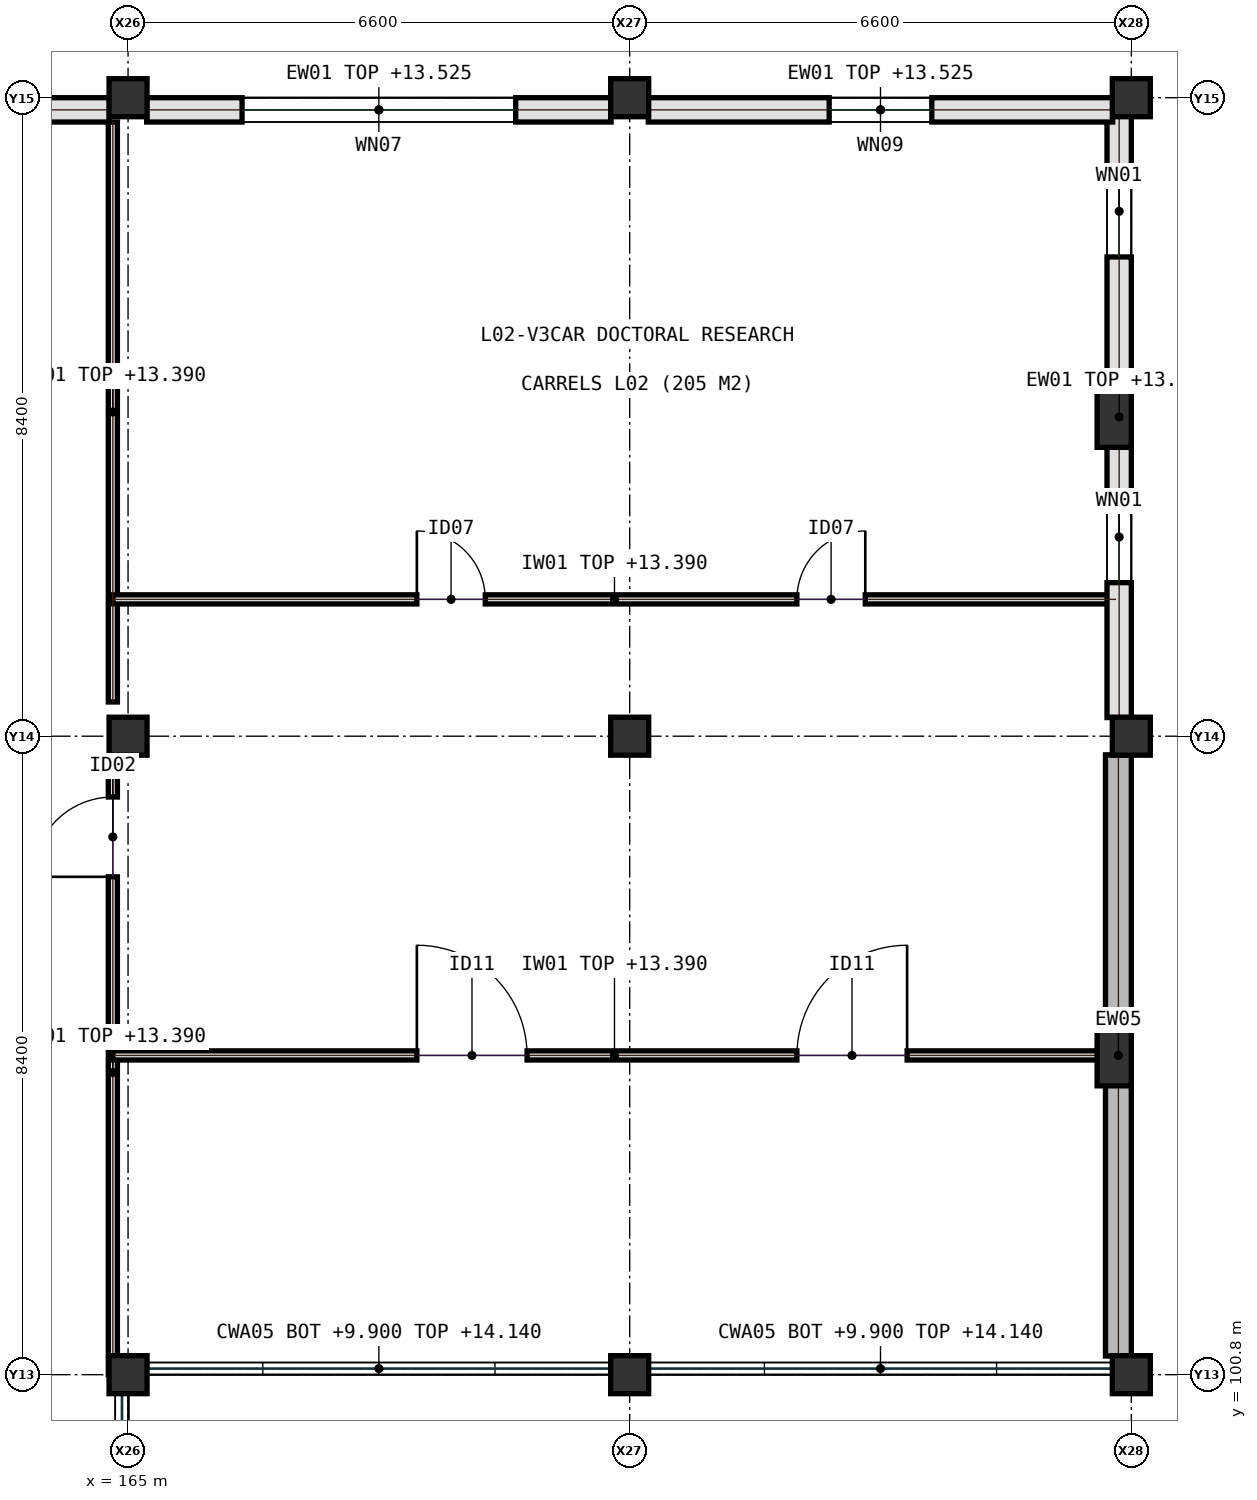
"""IFC4 building model, lengths in metres.
Left out: names, types, materials, properties, quantities, classifications, styles, units other than length and angle.
Written with IfcOpenShell. Run it as: python <this file> out.ifc"""

import sys

from ifc_helpers import new_model, si_unit, direction, frame, frame_2d, origin, origin_2d, place, context, subcontext, project, spatial, rectangle, extrude, element, fill, save


model = new_model("IFC4")
c1 = context("Model", 3, precision=1e-05, world=origin(), true_north=direction((0.0, 1.0)))
c2 = subcontext(c1, "Body", "Model", "MODEL_VIEW")
j1 = project(units=[si_unit("LENGTHUNIT", "METRE"), si_unit("PLANEANGLEUNIT", "RADIAN")], contexts=[c1])
p1 = place(None, origin())
s1 = spatial("IfcSite", under=j1, at=p1, CompositionType="ELEMENT")
p2 = place(p1, origin())
s2 = spatial("IfcBuilding", under=s1, at=p2, CompositionType="ELEMENT")
p3 = place(p2, frame((0.0, 0.0, 9.9)))
s3 = spatial("IfcBuildingStorey", under=s2, at=p3, CompositionType="ELEMENT", Elevation=9.9)
for number, where, z_axis, x_axis in (
    (1, (165.0, 100.8, 0.0), (0.0, 0.0, 1.0), (1.0, 0.0, 0.0)),
    (2, (165.0, 109.2, 0.0), (0.0, 0.0, 1.0), (1.0, 0.0, 0.0)),
    (3, (165.0, 117.6, 0.0), (0.0, 0.0, 1.0), (1.0, 0.0, 0.0)),
    (4, (171.6, 100.8, 0.0), (0.0, 0.0, 1.0), (1.0, 0.0, 0.0)),
    (5, (171.6, 109.2, 0.0), (0.0, 0.0, 1.0), (1.0, 0.0, 0.0)),
    (6, (171.6, 117.6, 0.0), (0.0, 0.0, 1.0), (1.0, 0.0, 0.0)),
    (7, (178.2, 100.8, 0.0), (0.0, 0.0, 1.0), (1.0, 0.0, 0.0)),
    (8, (178.2, 109.2, 0.0), (0.0, 0.0, 1.0), (1.0, 0.0, 0.0)),
    (9, (178.2, 117.6, 0.0), (0.0, 0.0, 1.0), (1.0, 0.0, 0.0)),
):
    element("IfcColumn", number, at=place(p3, frame(where, z_axis=z_axis, x_axis=x_axis)), inside=s3, PredefinedType="COLUMN", context=c2, shape_type="SweptSolid", body=[
        extrude(rectangle(XDim=0.5, YDim=0.5, at=origin_2d()), origin(), (0.0, 0.0, 1.0), 4.5),
    ])
for number, where, z_axis, x_axis in (
    (10, (177.975, 105.0, 0.0), (0.0, 0.0, 1.0), (1.0, 0.0, 0.0)),
    (11, (177.975, 113.4, 0.0), (0.0, 0.0, 1.0), (1.0, 0.0, 0.0)),
):
    element("IfcColumn", number, at=place(p3, frame(where, z_axis=z_axis, x_axis=x_axis)), inside=s3, PredefinedType="PILASTER", context=c2, shape_type="SweptSolid", body=[
        extrude(rectangle(XDim=0.45, YDim=0.8, at=origin_2d()), origin(), (0.0, 0.0, 1.0), 4.5),
    ])
p4 = place(p3, frame((164.8, 100.8, 0.0), z_axis=(0.0, 0.0, 1.0), x_axis=(0.0, 1.0, 0.0)))
e12 = element("IfcWall", 12, at=p4, inside=s3, PredefinedType="PARTITIONING", context=c2, shape_type="SweptSolid", body=[
    extrude(rectangle(XDim=7.95, YDim=0.12, at=frame_2d((3.975, 0.0))), origin(), (0.0, 0.0, 1.0), 3.49),
])
p5 = place(p4, frame((6.55, 0.0, 0.0)))
e13 = element("IfcOpeningElement", 13, at=p5, cuts=e12, PredefinedType="OPENING", context=c2, shape_type="SweptSolid", body=[
    extrude(rectangle(XDim=1.05, YDim=2.15, at=frame_2d((0.525, 1.075))), frame((0.0, 0.07, 0.0), z_axis=(0.0, -1.0, 0.0), x_axis=(1.0, 0.0, 0.0)), (0.0, 0.0, 1.0), 0.14),
])
p6 = place(p3, frame((164.8, 109.65, 0.0), z_axis=(0.0, 0.0, 1.0), x_axis=(0.0, 1.0, 0.0)))
e14 = element("IfcWall", 14, at=p6, inside=s3, PredefinedType="PARTITIONING", context=c2, shape_type="SweptSolid", body=[
    extrude(rectangle(XDim=7.63, YDim=0.12, at=frame_2d((3.815, 0.0))), origin(), (0.0, 0.0, 1.0), 3.49),
])
p7 = place(p3, frame((164.8, 105.0, 0.0), z_axis=(0.0, 0.0, 1.0), x_axis=(1.0, 0.0, 0.0)))
e15 = element("IfcWall", 15, at=p7, inside=s3, PredefinedType="PARTITIONING", context=c2, shape_type="SweptSolid", body=[
    extrude(rectangle(XDim=13.2, YDim=0.12, at=frame_2d((6.6, 0.0))), origin(), (0.0, 0.0, 1.0), 3.49),
])
p8 = place(p7, frame((4.0, 0.0, 0.0)))
e16 = element("IfcOpeningElement", 16, at=p8, cuts=e15, PredefinedType="OPENING", context=c2, shape_type="SweptSolid", body=[
    extrude(rectangle(XDim=1.45, YDim=2.25, at=frame_2d((0.725, 1.125))), frame((0.0, 0.07, 0.0), z_axis=(0.0, -1.0, 0.0), x_axis=(1.0, 0.0, 0.0)), (0.0, 0.0, 1.0), 0.14),
])
p9 = place(p7, frame((9.0, 0.0, 0.0)))
e17 = element("IfcOpeningElement", 17, at=p9, cuts=e15, PredefinedType="OPENING", context=c2, shape_type="SweptSolid", body=[
    extrude(rectangle(XDim=1.45, YDim=2.25, at=frame_2d((0.725, 1.125))), frame((0.0, 0.07, 0.0), z_axis=(0.0, -1.0, 0.0), x_axis=(1.0, 0.0, 0.0)), (0.0, 0.0, 1.0), 0.14),
])
p10 = place(p3, frame((164.8, 111.0, 0.0), z_axis=(0.0, 0.0, 1.0), x_axis=(1.0, 0.0, 0.0)))
e18 = element("IfcWall", 18, at=p10, inside=s3, PredefinedType="PARTITIONING", context=c2, shape_type="SweptSolid", body=[
    extrude(rectangle(XDim=13.2, YDim=0.12, at=frame_2d((6.6, 0.0))), origin(), (0.0, 0.0, 1.0), 3.49),
])
p11 = place(p10, frame((4.0, 0.0, 0.0)))
e19 = element("IfcOpeningElement", 19, at=p11, cuts=e18, PredefinedType="OPENING", context=c2, shape_type="SweptSolid", body=[
    extrude(rectangle(XDim=0.9, YDim=2.1, at=frame_2d((0.45, 1.05))), frame((0.0, 0.07, 0.0), z_axis=(0.0, -1.0, 0.0), x_axis=(1.0, 0.0, 0.0)), (0.0, 0.0, 1.0), 0.14),
])
p12 = place(p10, frame((9.0, 0.0, 0.0)))
e20 = element("IfcOpeningElement", 20, at=p12, cuts=e18, PredefinedType="OPENING", context=c2, shape_type="SweptSolid", body=[
    extrude(rectangle(XDim=0.9, YDim=2.1, at=frame_2d((0.45, 1.05))), frame((0.0, 0.07, 0.0), z_axis=(0.0, -1.0, 0.0), x_axis=(1.0, 0.0, 0.0)), (0.0, 0.0, 1.0), 0.14),
])
p13 = place(p3, frame((164.755, 117.44, 0.0), z_axis=(0.0, 0.0, 1.0), x_axis=(-1.0, 0.0, 0.0)))
e21 = element("IfcWall", 21, at=p13, inside=s3, PredefinedType="SOLIDWALL", context=c2, shape_type="SweptSolid", body=[
    extrude(rectangle(XDim=6.11, YDim=0.32, at=frame_2d((3.055, 0.0))), origin(), (0.0, 0.0, 1.0), 3.625),
])
p14 = place(p13, frame((1.855, 0.0, 0.95)))
e22 = element("IfcOpeningElement", 22, at=p14, cuts=e21, PredefinedType="OPENING", context=c2, shape_type="SweptSolid", body=[
    extrude(rectangle(XDim=2.4, YDim=1.6, at=frame_2d((1.2, 0.8))), frame((0.0, 0.17, 0.0), z_axis=(0.0, -1.0, 0.0), x_axis=(1.0, 0.0, 0.0)), (0.0, 0.0, 1.0), 0.34),
])
p15 = place(p3, frame((171.355, 117.44, 0.0), z_axis=(0.0, 0.0, 1.0), x_axis=(-1.0, 0.0, 0.0)))
e23 = element("IfcWall", 23, at=p15, inside=s3, PredefinedType="SOLIDWALL", context=c2, shape_type="SweptSolid", body=[
    extrude(rectangle(XDim=6.11, YDim=0.32, at=frame_2d((3.055, 0.0))), origin(), (0.0, 0.0, 1.0), 3.625),
])
p16 = place(p15, frame((1.255, 0.0, 0.95)))
e24 = element("IfcOpeningElement", 24, at=p16, cuts=e23, PredefinedType="OPENING", context=c2, shape_type="SweptSolid", body=[
    extrude(rectangle(XDim=3.6, YDim=2.0, at=frame_2d((1.8, 1.0))), frame((0.0, 0.17, 0.0), z_axis=(0.0, -1.0, 0.0), x_axis=(1.0, 0.0, 0.0)), (0.0, 0.0, 1.0), 0.34),
])
p17 = place(p3, frame((178.03, 101.045, 0.0), z_axis=(0.0, 0.0, 1.0), x_axis=(0.0, 1.0, 0.0)))
e25 = element("IfcWall", 25, at=p17, inside=s3, PredefinedType="SHEAR", context=c2, shape_type="SweptSolid", body=[
    extrude(rectangle(XDim=7.91, YDim=0.34, at=frame_2d((3.955, 0.0))), origin(), (0.0, 0.0, 1.0), 4.24),
])
p18 = place(p3, frame((178.04, 109.445, 0.0), z_axis=(0.0, 0.0, 1.0), x_axis=(0.0, 1.0, 0.0)))
e26 = element("IfcWall", 26, at=p18, inside=s3, PredefinedType="SOLIDWALL", context=c2, shape_type="SweptSolid", body=[
    extrude(rectangle(XDim=7.91, YDim=0.32, at=frame_2d((3.955, 0.0))), origin(), (0.0, 0.0, 1.0), 3.625),
])
p19 = place(p18, frame((1.775, 0.0, 0.95)))
e27 = element("IfcOpeningElement", 27, at=p19, cuts=e26, PredefinedType="OPENING", context=c2, shape_type="SweptSolid", body=[
    extrude(rectangle(XDim=1.2, YDim=1.5, at=frame_2d((0.6, 0.75))), frame((0.0, 0.17, 0.0), z_axis=(0.0, -1.0, 0.0), x_axis=(1.0, 0.0, 0.0)), (0.0, 0.0, 1.0), 0.34),
])
p20 = place(p18, frame((6.06, 0.0, 0.95)))
e28 = element("IfcOpeningElement", 28, at=p20, cuts=e26, PredefinedType="OPENING", context=c2, shape_type="SweptSolid", body=[
    extrude(rectangle(XDim=1.2, YDim=1.5, at=frame_2d((0.6, 0.75))), frame((0.0, 0.17, 0.0), z_axis=(0.0, -1.0, 0.0), x_axis=(1.0, 0.0, 0.0)), (0.0, 0.0, 1.0), 0.34),
])
p21 = place(p3, frame((177.955, 117.44, 0.0), z_axis=(0.0, 0.0, 1.0), x_axis=(-1.0, 0.0, 0.0)))
e29 = element("IfcWall", 29, at=p21, inside=s3, PredefinedType="SOLIDWALL", context=c2, shape_type="SweptSolid", body=[
    extrude(rectangle(XDim=6.11, YDim=0.32, at=frame_2d((3.055, 0.0))), origin(), (0.0, 0.0, 1.0), 3.625),
])
p22 = place(p21, frame((2.38, 0.0, 0.95)))
e30 = element("IfcOpeningElement", 30, at=p22, cuts=e29, PredefinedType="OPENING", context=c2, shape_type="SweptSolid", body=[
    extrude(rectangle(XDim=1.35, YDim=1.55, at=frame_2d((0.675, 0.775))), frame((0.0, 0.17, 0.0), z_axis=(0.0, -1.0, 0.0), x_axis=(1.0, 0.0, 0.0)), (0.0, 0.0, 1.0), 0.34),
])
p23 = place(p5, origin())
e31 = element("IfcDoor", 31, at=p23, inside=s3, OperationType="SINGLE_SWING_LEFT", PredefinedType="DOOR", context=c2, shape_type="SweptSolid", body=[
    extrude(rectangle(XDim=1.05, YDim=2.15, at=frame_2d((0.525, 1.075))), frame((0.0, 0.025, 0.0), z_axis=(0.0, -1.0, 0.0), x_axis=(1.0, 0.0, 0.0)), (0.0, 0.0, 1.0), 0.05),
])
fill(e13, e31)
p24 = place(p8, origin())
e32 = element("IfcDoor", 32, at=p24, inside=s3, OperationType="SINGLE_SWING_LEFT", PredefinedType="DOOR", context=c2, shape_type="SweptSolid", body=[
    extrude(rectangle(XDim=1.45, YDim=2.25, at=frame_2d((0.725, 1.125))), frame((0.0, 0.025, 0.0), z_axis=(0.0, -1.0, 0.0), x_axis=(1.0, 0.0, 0.0)), (0.0, 0.0, 1.0), 0.05),
])
fill(e16, e32)
p25 = place(p9, origin())
e33 = element("IfcDoor", 33, at=p25, inside=s3, OperationType="SINGLE_SWING_RIGHT", PredefinedType="DOOR", context=c2, shape_type="SweptSolid", body=[
    extrude(rectangle(XDim=1.45, YDim=2.25, at=frame_2d((0.725, 1.125))), frame((0.0, 0.025, 0.0), z_axis=(0.0, -1.0, 0.0), x_axis=(1.0, 0.0, 0.0)), (0.0, 0.0, 1.0), 0.05),
])
fill(e17, e33)
p26 = place(p11, origin())
e34 = element("IfcDoor", 34, at=p26, inside=s3, OperationType="SINGLE_SWING_LEFT", PredefinedType="DOOR", context=c2, shape_type="SweptSolid", body=[
    extrude(rectangle(XDim=0.9, YDim=2.1, at=frame_2d((0.45, 1.05))), frame((0.0, 0.025, 0.0), z_axis=(0.0, -1.0, 0.0), x_axis=(1.0, 0.0, 0.0)), (0.0, 0.0, 1.0), 0.05),
])
fill(e19, e34)
p27 = place(p12, origin())
e35 = element("IfcDoor", 35, at=p27, inside=s3, OperationType="SINGLE_SWING_RIGHT", PredefinedType="DOOR", context=c2, shape_type="SweptSolid", body=[
    extrude(rectangle(XDim=0.9, YDim=2.1, at=frame_2d((0.45, 1.05))), frame((0.0, 0.025, 0.0), z_axis=(0.0, -1.0, 0.0), x_axis=(1.0, 0.0, 0.0)), (0.0, 0.0, 1.0), 0.05),
])
fill(e20, e35)
p28 = place(p16, origin())
e36 = element("IfcWindow", 36, at=p28, inside=s3, PartitioningType="SINGLE_PANEL", PredefinedType="WINDOW", context=c2, shape_type="SweptSolid", body=[
    extrude(rectangle(XDim=3.6, YDim=2.0, at=frame_2d((1.8, 1.0))), frame((0.0, 0.03, 0.0), z_axis=(0.0, -1.0, 0.0), x_axis=(1.0, 0.0, 0.0)), (0.0, 0.0, 1.0), 0.06),
])
fill(e24, e36)
p29 = place(p19, origin())
e37 = element("IfcWindow", 37, at=p29, inside=s3, PartitioningType="SINGLE_PANEL", PredefinedType="WINDOW", context=c2, shape_type="SweptSolid", body=[
    extrude(rectangle(XDim=1.2, YDim=1.5, at=frame_2d((0.6, 0.75))), frame((0.0, 0.03, 0.0), z_axis=(0.0, -1.0, 0.0), x_axis=(1.0, 0.0, 0.0)), (0.0, 0.0, 1.0), 0.06),
])
fill(e27, e37)
p30 = place(p20, origin())
e38 = element("IfcWindow", 38, at=p30, inside=s3, PartitioningType="SINGLE_PANEL", PredefinedType="WINDOW", context=c2, shape_type="SweptSolid", body=[
    extrude(rectangle(XDim=1.2, YDim=1.5, at=frame_2d((0.6, 0.75))), frame((0.0, 0.03, 0.0), z_axis=(0.0, -1.0, 0.0), x_axis=(1.0, 0.0, 0.0)), (0.0, 0.0, 1.0), 0.06),
])
fill(e28, e38)
p31 = place(p22, origin())
e39 = element("IfcWindow", 39, at=p31, inside=s3, PartitioningType="SINGLE_PANEL", PredefinedType="WINDOW", context=c2, shape_type="SweptSolid", body=[
    extrude(rectangle(XDim=1.35, YDim=1.55, at=frame_2d((0.675, 0.775))), frame((0.0, 0.03, 0.0), z_axis=(0.0, -1.0, 0.0), x_axis=(1.0, 0.0, 0.0)), (0.0, 0.0, 1.0), 0.06),
])
fill(e30, e39)
save(model, sys.argv[1])
